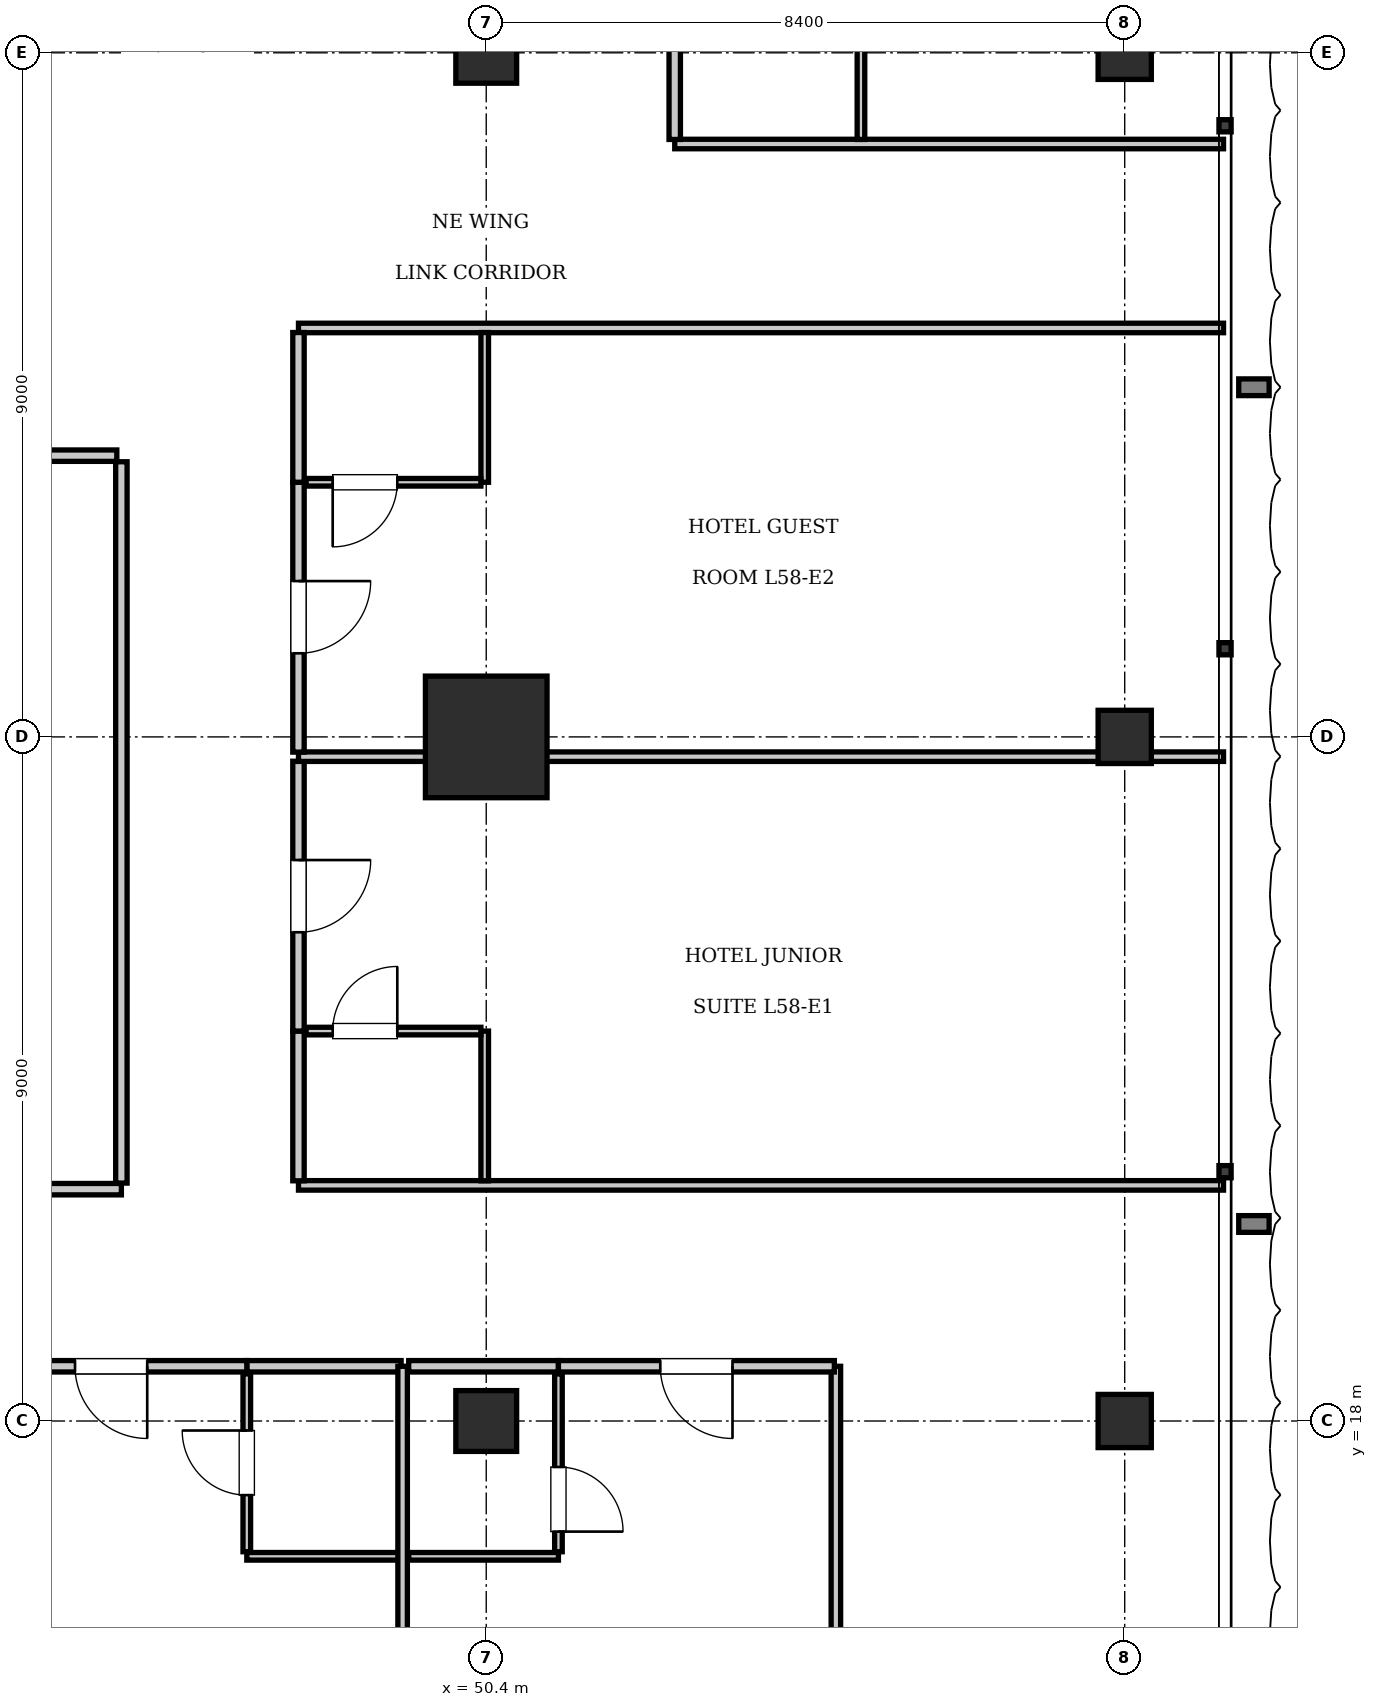
"""IFC4 building model, lengths in metres.
Left out: names, types, materials, properties, quantities, classifications, styles, units other than length and angle.
Written with IfcOpenShell. Run it as: python <this file> out.ifc"""

import sys

from ifc_helpers import new_model, si_unit, direction, frame, frame_2d, origin, origin_2d, place, context, subcontext, project, spatial, rectangle, extrude, element, fill, save


model = new_model("IFC4")
c1 = context("Model", 3, precision=1e-05, world=origin(), true_north=direction((0.0, 1.0)))
c2 = subcontext(c1, "Body", "Model", "MODEL_VIEW")
j1 = project(units=[si_unit("LENGTHUNIT", "METRE"), si_unit("PLANEANGLEUNIT", "RADIAN")], contexts=[c1])
p1 = place(None, origin())
s1 = spatial("IfcSite", under=j1, at=p1, CompositionType="ELEMENT")
p2 = place(p1, origin())
s2 = spatial("IfcBuilding", under=s1, at=p2, CompositionType="ELEMENT")
p3 = place(p2, frame((0.0, 0.0, 239.4)))
s3 = spatial("IfcBuildingStorey", under=s2, at=p3, CompositionType="ELEMENT", Elevation=239.4)
p4 = place(p3, frame((50.4, 27.0, 0.0), z_axis=(0.0, 0.0, 1.0), x_axis=(1.0, 0.0, 0.0)))
e1 = element("IfcColumn", 1, at=p4, inside=s3, PredefinedType="COLUMN", context=c2, shape_type="SweptSolid", body=[
    extrude(rectangle(XDim=1.6, YDim=1.6, at=origin_2d()), origin(), (0.0, 0.0, 1.0), 3.85),
])
for number, where, z_axis, x_axis in (
    (2, (50.4, 36.0, 0.0), (0.0, 0.0, 1.0), (1.0, 0.0, 0.0)),
    (3, (50.4, 18.0, 0.0), (0.0, 0.0, 1.0), (1.0, 0.0, 0.0)),
):
    element("IfcColumn", number, at=place(p3, frame(where, z_axis=z_axis, x_axis=x_axis)), inside=s3, PredefinedType="COLUMN", context=c2, shape_type="SweptSolid", body=[
        extrude(rectangle(XDim=0.8, YDim=0.8, at=origin_2d()), origin(), (0.0, 0.0, 1.0), 3.85),
    ])
for number, where, z_axis, x_axis in (
    (4, (58.8, 18.0, 0.0), (0.0, 0.0, 1.0), (1.0, 0.0, 0.0)),
    (5, (58.8, 27.0, 0.0), (0.0, 0.0, 1.0), (1.0, 0.0, 0.0)),
    (6, (58.8, 36.0, 0.0), (0.0, 0.0, 1.0), (1.0, 0.0, 0.0)),
):
    element("IfcColumn", number, at=place(p3, frame(where, z_axis=z_axis, x_axis=x_axis)), inside=s3, PredefinedType="COLUMN", context=c2, shape_type="SweptSolid", body=[
        extrude(rectangle(XDim=0.7, YDim=0.7, at=origin_2d()), origin(), (0.0, 0.0, 1.0), 3.85),
    ])
p5 = place(p3, frame((30.05, 21.05, 0.0), z_axis=(0.0, 0.0, 1.0), x_axis=(1.0, 0.0, 0.0)))
e7 = element("IfcWall", 7, at=p5, inside=s3, PredefinedType="PARTITIONING", context=c2, shape_type="SweptSolid", body=[
    extrude(rectangle(XDim=15.55, YDim=0.15, at=frame_2d((7.775, 0.0))), origin(), (0.0, 0.0, 1.0), 3.61),
])
p6 = place(p3, frame((45.6, 21.13, 0.0), z_axis=(0.0, 0.0, 1.0), x_axis=(0.0, 1.0, 0.0)))
e8 = element("IfcWall", 8, at=p6, inside=s3, PredefinedType="PARTITIONING", context=c2, shape_type="SweptSolid", body=[
    extrude(rectangle(XDim=9.49, YDim=0.15, at=frame_2d((4.745, 0.0))), origin(), (0.0, 0.0, 1.0), 3.61),
])
p7 = place(p3, frame((35.833, 30.7, 0.0), z_axis=(0.0, 0.0, 1.0), x_axis=(1.0, 0.0, 0.0)))
e9 = element("IfcWall", 9, at=p7, inside=s3, PredefinedType="PARTITIONING", context=c2, shape_type="SweptSolid", body=[
    extrude(rectangle(XDim=9.707, YDim=0.15, at=frame_2d((4.853, 0.0))), origin(), (0.0, 0.0, 1.0), 3.61),
])
p8 = place(p7, frame((4.403, 0.0, 0.0)))
e10 = element("IfcOpeningElement", 10, at=p8, cuts=e9, PredefinedType="OPENING", context=c2, shape_type="SweptSolid", body=[
    extrude(rectangle(XDim=0.9, YDim=2.1, at=frame_2d((0.45, 1.05))), frame((0.0, 0.085, 0.0), z_axis=(0.0, -1.0, 0.0), x_axis=(1.0, 0.0, 0.0)), (0.0, 0.0, 1.0), 0.17),
])
p9 = place(p3, frame((55.0, 14.4, 0.0), z_axis=(0.0, 0.0, 1.0), x_axis=(0.0, 1.0, 0.0)))
e11 = element("IfcWall", 11, at=p9, inside=s3, PredefinedType="PARTITIONING", context=c2, shape_type="SweptSolid", body=[
    extrude(rectangle(XDim=4.32, YDim=0.125, at=frame_2d((2.16, 0.0))), origin(), (0.0, 0.0, 1.0), 3.61),
])
p10 = place(p3, frame((47.25, 18.72, 0.0), z_axis=(0.0, 0.0, 1.0), x_axis=(1.0, 0.0, 0.0)))
e12 = element("IfcWall", 12, at=p10, inside=s3, PredefinedType="PARTITIONING", context=c2, shape_type="SweptSolid", body=[
    extrude(rectangle(XDim=2.03, YDim=0.15, at=frame_2d((1.015, 0.0))), origin(), (0.0, 0.0, 1.0), 3.61),
])
p11 = place(p3, frame((47.25, 16.22, 0.0), z_axis=(0.0, 0.0, 1.0), x_axis=(1.0, 0.0, 0.0)))
e13 = element("IfcWall", 13, at=p11, inside=s3, PredefinedType="PARTITIONING", context=c2, shape_type="SweptSolid", body=[
    extrude(rectangle(XDim=2.01, YDim=0.1, at=frame_2d((1.005, 0.0))), origin(), (0.0, 0.0, 1.0), 3.61),
])
p12 = place(p3, frame((47.25, 16.28, 0.0), z_axis=(0.0, 0.0, 1.0), x_axis=(0.0, 1.0, 0.0)))
e14 = element("IfcWall", 14, at=p12, inside=s3, PredefinedType="PARTITIONING", context=c2, shape_type="SweptSolid", body=[
    extrude(rectangle(XDim=2.34, YDim=0.1, at=frame_2d((1.17, 0.0))), origin(), (0.0, 0.0, 1.0), 3.61),
])
p13 = place(p12, frame((0.745, 0.0, 0.0)))
e15 = element("IfcOpeningElement", 15, at=p13, cuts=e14, PredefinedType="OPENING", context=c2, shape_type="SweptSolid", body=[
    extrude(rectangle(XDim=0.85, YDim=2.1, at=frame_2d((0.425, 1.05))), frame((0.0, 0.06, 0.0), z_axis=(0.0, -1.0, 0.0), x_axis=(1.0, 0.0, 0.0)), (0.0, 0.0, 1.0), 0.12),
])
p14 = place(p3, frame((43.68, 18.72, 0.0), z_axis=(0.0, 0.0, 1.0), x_axis=(1.0, 0.0, 0.0)))
e16 = element("IfcWall", 16, at=p14, inside=s3, PredefinedType="PARTITIONING", context=c2, shape_type="SweptSolid", body=[
    extrude(rectangle(XDim=3.57, YDim=0.15, at=frame_2d((1.785, 0.0))), origin(), (0.0, 0.0, 1.0), 3.61),
])
p15 = place(p14, frame((1.31, 0.0, 0.0)))
e17 = element("IfcOpeningElement", 17, at=p15, cuts=e16, PredefinedType="OPENING", context=c2, shape_type="SweptSolid", body=[
    extrude(rectangle(XDim=0.95, YDim=2.15, at=frame_2d((0.475, 1.075))), frame((0.0, 0.085, 0.0), z_axis=(0.0, -1.0, 0.0), x_axis=(1.0, 0.0, 0.0)), (0.0, 0.0, 1.0), 0.17),
])
p16 = place(p3, frame((49.3, 9.3, 0.0), z_axis=(0.0, 0.0, 1.0), x_axis=(0.0, 1.0, 0.0)))
e18 = element("IfcWall", 18, at=p16, inside=s3, PredefinedType="PARTITIONING", context=c2, shape_type="SweptSolid", body=[
    extrude(rectangle(XDim=9.42, YDim=0.125, at=frame_2d((4.71, 0.0))), origin(), (0.0, 0.0, 1.0), 3.61),
])
p17 = place(p3, frame((49.38, 18.72, 0.0), z_axis=(0.0, 0.0, 1.0), x_axis=(1.0, 0.0, 0.0)))
e19 = element("IfcWall", 19, at=p17, inside=s3, PredefinedType="PARTITIONING", context=c2, shape_type="SweptSolid", body=[
    extrude(rectangle(XDim=1.97, YDim=0.15, at=frame_2d((0.985, 0.0))), origin(), (0.0, 0.0, 1.0), 3.61),
])
p18 = place(p3, frame((49.38, 16.22, 0.0), z_axis=(0.0, 0.0, 1.0), x_axis=(1.0, 0.0, 0.0)))
e20 = element("IfcWall", 20, at=p18, inside=s3, PredefinedType="PARTITIONING", context=c2, shape_type="SweptSolid", body=[
    extrude(rectangle(XDim=1.97, YDim=0.1, at=frame_2d((0.985, 0.0))), origin(), (0.0, 0.0, 1.0), 3.61),
])
p19 = place(p3, frame((51.35, 16.28, 0.0), z_axis=(0.0, 0.0, 1.0), x_axis=(0.0, 1.0, 0.0)))
e21 = element("IfcWall", 21, at=p19, inside=s3, PredefinedType="PARTITIONING", context=c2, shape_type="SweptSolid", body=[
    extrude(rectangle(XDim=2.34, YDim=0.1, at=frame_2d((1.17, 0.0))), origin(), (0.0, 0.0, 1.0), 3.61),
])
p20 = place(p19, frame((0.265, 0.0, 0.0)))
e22 = element("IfcOpeningElement", 22, at=p20, cuts=e21, PredefinedType="OPENING", context=c2, shape_type="SweptSolid", body=[
    extrude(rectangle(XDim=0.85, YDim=2.1, at=frame_2d((0.425, 1.05))), frame((0.0, 0.06, 0.0), z_axis=(0.0, -1.0, 0.0), x_axis=(1.0, 0.0, 0.0)), (0.0, 0.0, 1.0), 0.12),
])
p21 = place(p3, frame((51.35, 18.72, 0.0), z_axis=(0.0, 0.0, 1.0), x_axis=(1.0, 0.0, 0.0)))
e23 = element("IfcWall", 23, at=p21, inside=s3, PredefinedType="PARTITIONING", context=c2, shape_type="SweptSolid", body=[
    extrude(rectangle(XDim=3.63, YDim=0.15, at=frame_2d((1.815, 0.0))), origin(), (0.0, 0.0, 1.0), 3.61),
])
p22 = place(p21, frame((1.34, 0.0, 0.0)))
e24 = element("IfcOpeningElement", 24, at=p22, cuts=e23, PredefinedType="OPENING", context=c2, shape_type="SweptSolid", body=[
    extrude(rectangle(XDim=0.95, YDim=2.15, at=frame_2d((0.475, 1.075))), frame((0.0, 0.085, 0.0), z_axis=(0.0, -1.0, 0.0), x_axis=(1.0, 0.0, 0.0)), (0.0, 0.0, 1.0), 0.17),
])
for number, where, z_axis, x_axis in (
    (25, (47.93, 21.1, 0.0), (0.0, 0.0, 1.0), (1.0, 0.0, 0.0)),
    (26, (47.93, 32.38, 0.0), (0.0, 0.0, 1.0), (1.0, 0.0, 0.0)),
):
    element("IfcWall", number, at=place(p3, frame(where, z_axis=z_axis, x_axis=x_axis)), inside=s3, PredefinedType="PARTITIONING", context=c2, shape_type="SweptSolid", body=[
        extrude(rectangle(XDim=12.17, YDim=0.125, at=frame_2d((6.085, 0.0))), origin(), (0.0, 0.0, 1.0), 3.61),
    ])
p23 = place(p3, frame((47.93, 21.16, 0.0), z_axis=(0.0, 0.0, 1.0), x_axis=(0.0, 1.0, 0.0)))
e27 = element("IfcWall", 27, at=p23, inside=s3, PredefinedType="PARTITIONING", context=c2, shape_type="SweptSolid", body=[
    extrude(rectangle(XDim=1.97, YDim=0.15, at=frame_2d((0.985, 0.0))), origin(), (0.0, 0.0, 1.0), 3.61),
])
p24 = place(p3, frame((47.93, 23.13, 0.0), z_axis=(0.0, 0.0, 1.0), x_axis=(0.0, 1.0, 0.0)))
e28 = element("IfcWall", 28, at=p24, inside=s3, PredefinedType="PARTITIONING", context=c2, shape_type="SweptSolid", body=[
    extrude(rectangle(XDim=3.55, YDim=0.15, at=frame_2d((1.775, 0.0))), origin(), (0.0, 0.0, 1.0), 3.61),
])
p25 = place(p24, frame((1.3, 0.0, 0.0)))
e29 = element("IfcOpeningElement", 29, at=p25, cuts=e28, PredefinedType="OPENING", context=c2, shape_type="SweptSolid", body=[
    extrude(rectangle(XDim=0.95, YDim=2.15, at=frame_2d((0.475, 1.075))), frame((0.0, 0.085, 0.0), z_axis=(0.0, -1.0, 0.0), x_axis=(1.0, 0.0, 0.0)), (0.0, 0.0, 1.0), 0.17),
])
p26 = place(p3, frame((50.38, 21.16, 0.0), z_axis=(0.0, 0.0, 1.0), x_axis=(0.0, 1.0, 0.0)))
e30 = element("IfcWall", 30, at=p26, inside=s3, PredefinedType="PARTITIONING", context=c2, shape_type="SweptSolid", body=[
    extrude(rectangle(XDim=1.97, YDim=0.1, at=frame_2d((0.985, 0.0))), origin(), (0.0, 0.0, 1.0), 3.077),
])
p27 = place(p3, frame((48.03, 23.13, 0.0), z_axis=(0.0, 0.0, 1.0), x_axis=(1.0, 0.0, 0.0)))
e31 = element("IfcWall", 31, at=p27, inside=s3, PredefinedType="PARTITIONING", context=c2, shape_type="SweptSolid", body=[
    extrude(rectangle(XDim=2.3, YDim=0.1, at=frame_2d((1.15, 0.0))), origin(), (0.0, 0.0, 1.0), 3.61),
])
p28 = place(p27, frame((0.35, 0.0, 0.0)))
e32 = element("IfcOpeningElement", 32, at=p28, cuts=e31, PredefinedType="OPENING", context=c2, shape_type="SweptSolid", body=[
    extrude(rectangle(XDim=0.85, YDim=2.1, at=frame_2d((0.425, 1.05))), frame((0.0, 0.06, 0.0), z_axis=(0.0, -1.0, 0.0), x_axis=(1.0, 0.0, 0.0)), (0.0, 0.0, 1.0), 0.12),
])
p29 = place(p3, frame((47.93, 26.74, 0.0), z_axis=(0.0, 0.0, 1.0), x_axis=(1.0, 0.0, 0.0)))
e33 = element("IfcWall", 33, at=p29, inside=s3, PredefinedType="PARTITIONING", context=c2, shape_type="SweptSolid", body=[
    extrude(rectangle(XDim=12.17, YDim=0.125, at=frame_2d((6.085, 0.0))), origin(), (0.0, 0.0, 1.0), 2.41),
])
p30 = place(p3, frame((47.93, 26.8, 0.0), z_axis=(0.0, 0.0, 1.0), x_axis=(0.0, 1.0, 0.0)))
e34 = element("IfcWall", 34, at=p30, inside=s3, PredefinedType="PARTITIONING", context=c2, shape_type="SweptSolid", body=[
    extrude(rectangle(XDim=3.55, YDim=0.15, at=frame_2d((1.775, 0.0))), origin(), (0.0, 0.0, 1.0), 3.61),
])
p31 = place(p30, frame((1.3, 0.0, 0.0)))
e35 = element("IfcOpeningElement", 35, at=p31, cuts=e34, PredefinedType="OPENING", context=c2, shape_type="SweptSolid", body=[
    extrude(rectangle(XDim=0.95, YDim=2.15, at=frame_2d((0.475, 1.075))), frame((0.0, 0.085, 0.0), z_axis=(0.0, -1.0, 0.0), x_axis=(1.0, 0.0, 0.0)), (0.0, 0.0, 1.0), 0.17),
])
p32 = place(p3, frame((47.93, 30.35, 0.0), z_axis=(0.0, 0.0, 1.0), x_axis=(0.0, 1.0, 0.0)))
e36 = element("IfcWall", 36, at=p32, inside=s3, PredefinedType="PARTITIONING", context=c2, shape_type="SweptSolid", body=[
    extrude(rectangle(XDim=1.97, YDim=0.15, at=frame_2d((0.985, 0.0))), origin(), (0.0, 0.0, 1.0), 3.61),
])
p33 = place(p3, frame((50.38, 30.35, 0.0), z_axis=(0.0, 0.0, 1.0), x_axis=(0.0, 1.0, 0.0)))
e37 = element("IfcWall", 37, at=p33, inside=s3, PredefinedType="PARTITIONING", context=c2, shape_type="SweptSolid", body=[
    extrude(rectangle(XDim=1.97, YDim=0.1, at=frame_2d((0.985, 0.0))), origin(), (0.0, 0.0, 1.0), 3.077),
])
p34 = place(p3, frame((48.03, 30.35, 0.0), z_axis=(0.0, 0.0, 1.0), x_axis=(1.0, 0.0, 0.0)))
e38 = element("IfcWall", 38, at=p34, inside=s3, PredefinedType="PARTITIONING", context=c2, shape_type="SweptSolid", body=[
    extrude(rectangle(XDim=2.3, YDim=0.1, at=frame_2d((1.15, 0.0))), origin(), (0.0, 0.0, 1.0), 3.61),
])
p35 = place(p34, frame((0.35, 0.0, 0.0)))
e39 = element("IfcOpeningElement", 39, at=p35, cuts=e38, PredefinedType="OPENING", context=c2, shape_type="SweptSolid", body=[
    extrude(rectangle(XDim=0.85, YDim=2.1, at=frame_2d((0.425, 1.05))), frame((0.0, 0.06, 0.0), z_axis=(0.0, -1.0, 0.0), x_axis=(1.0, 0.0, 0.0)), (0.0, 0.0, 1.0), 0.12),
])
p36 = place(p3, frame((52.88, 34.8, 0.0), z_axis=(0.0, 0.0, 1.0), x_axis=(1.0, 0.0, 0.0)))
e40 = element("IfcWall", 40, at=p36, inside=s3, PredefinedType="PARTITIONING", context=c2, shape_type="SweptSolid", body=[
    extrude(rectangle(XDim=7.22, YDim=0.125, at=frame_2d((3.61, 0.0))), origin(), (0.0, 0.0, 1.0), 3.61),
])
p37 = place(p3, frame((52.88, 34.86, 0.0), z_axis=(0.0, 0.0, 1.0), x_axis=(0.0, 1.0, 0.0)))
e41 = element("IfcWall", 41, at=p37, inside=s3, PredefinedType="PARTITIONING", context=c2, shape_type="SweptSolid", body=[
    extrude(rectangle(XDim=2.29, YDim=0.15, at=frame_2d((1.145, 0.0))), origin(), (0.0, 0.0, 1.0), 3.61),
])
p38 = place(p3, frame((55.33, 34.86, 0.0), z_axis=(0.0, 0.0, 1.0), x_axis=(0.0, 1.0, 0.0)))
e42 = element("IfcWall", 42, at=p38, inside=s3, PredefinedType="PARTITIONING", context=c2, shape_type="SweptSolid", body=[
    extrude(rectangle(XDim=2.29, YDim=0.1, at=frame_2d((1.145, 0.0))), origin(), (0.0, 0.0, 1.0), 3.61),
])
p39 = place(p13, origin())
e43 = element("IfcDoor", 43, at=p39, inside=s3, OperationType="SINGLE_SWING_RIGHT", PredefinedType="DOOR", context=c2, shape_type="SweptSolid", body=[
    extrude(rectangle(XDim=0.85, YDim=2.1, at=frame_2d((0.425, 1.05))), frame((0.0, 0.025, 0.0), z_axis=(0.0, -1.0, 0.0), x_axis=(1.0, 0.0, 0.0)), (0.0, 0.0, 1.0), 0.05),
])
fill(e15, e43)
p40 = place(p15, frame((0.95, 0.0, 0.0), z_axis=(0.0, 0.0, 1.0), x_axis=(-1.0, 0.0, 0.0)))
e44 = element("IfcDoor", 44, at=p40, inside=s3, OperationType="SINGLE_SWING_LEFT", PredefinedType="DOOR", context=c2, shape_type="SweptSolid", body=[
    extrude(rectangle(XDim=0.95, YDim=2.15, at=frame_2d((0.475, 1.075))), frame((0.0, 0.025, 0.0), z_axis=(0.0, -1.0, 0.0), x_axis=(1.0, 0.0, 0.0)), (0.0, 0.0, 1.0), 0.05),
])
fill(e17, e44)
p41 = place(p20, frame((0.85, 0.0, 0.0), z_axis=(0.0, 0.0, 1.0), x_axis=(-1.0, 0.0, 0.0)))
e45 = element("IfcDoor", 45, at=p41, inside=s3, OperationType="SINGLE_SWING_RIGHT", PredefinedType="DOOR", context=c2, shape_type="SweptSolid", body=[
    extrude(rectangle(XDim=0.85, YDim=2.1, at=frame_2d((0.425, 1.05))), frame((0.0, 0.025, 0.0), z_axis=(0.0, -1.0, 0.0), x_axis=(1.0, 0.0, 0.0)), (0.0, 0.0, 1.0), 0.05),
])
fill(e22, e45)
p42 = place(p22, frame((0.95, 0.0, 0.0), z_axis=(0.0, 0.0, 1.0), x_axis=(-1.0, 0.0, 0.0)))
e46 = element("IfcDoor", 46, at=p42, inside=s3, OperationType="SINGLE_SWING_LEFT", PredefinedType="DOOR", context=c2, shape_type="SweptSolid", body=[
    extrude(rectangle(XDim=0.95, YDim=2.15, at=frame_2d((0.475, 1.075))), frame((0.0, 0.025, 0.0), z_axis=(0.0, -1.0, 0.0), x_axis=(1.0, 0.0, 0.0)), (0.0, 0.0, 1.0), 0.05),
])
fill(e24, e46)
p43 = place(p28, origin())
e47 = element("IfcDoor", 47, at=p43, inside=s3, OperationType="SINGLE_SWING_RIGHT", PredefinedType="DOOR", context=c2, shape_type="SweptSolid", body=[
    extrude(rectangle(XDim=0.85, YDim=2.1, at=frame_2d((0.425, 1.05))), frame((0.0, 0.025, 0.0), z_axis=(0.0, -1.0, 0.0), x_axis=(1.0, 0.0, 0.0)), (0.0, 0.0, 1.0), 0.05),
])
fill(e32, e47)
p44 = place(p25, frame((0.95, 0.0, 0.0), z_axis=(0.0, 0.0, 1.0), x_axis=(-1.0, 0.0, 0.0)))
e48 = element("IfcDoor", 48, at=p44, inside=s3, OperationType="SINGLE_SWING_LEFT", PredefinedType="DOOR", context=c2, shape_type="SweptSolid", body=[
    extrude(rectangle(XDim=0.95, YDim=2.15, at=frame_2d((0.475, 1.075))), frame((0.0, 0.025, 0.0), z_axis=(0.0, -1.0, 0.0), x_axis=(1.0, 0.0, 0.0)), (0.0, 0.0, 1.0), 0.05),
])
fill(e29, e48)
p45 = place(p35, frame((0.85, 0.0, 0.0), z_axis=(0.0, 0.0, 1.0), x_axis=(-1.0, 0.0, 0.0)))
e49 = element("IfcDoor", 49, at=p45, inside=s3, OperationType="SINGLE_SWING_RIGHT", PredefinedType="DOOR", context=c2, shape_type="SweptSolid", body=[
    extrude(rectangle(XDim=0.85, YDim=2.1, at=frame_2d((0.425, 1.05))), frame((0.0, 0.025, 0.0), z_axis=(0.0, -1.0, 0.0), x_axis=(1.0, 0.0, 0.0)), (0.0, 0.0, 1.0), 0.05),
])
fill(e39, e49)
p46 = place(p31, frame((0.95, 0.0, 0.0), z_axis=(0.0, 0.0, 1.0), x_axis=(-1.0, 0.0, 0.0)))
e50 = element("IfcDoor", 50, at=p46, inside=s3, OperationType="SINGLE_SWING_LEFT", PredefinedType="DOOR", context=c2, shape_type="SweptSolid", body=[
    extrude(rectangle(XDim=0.95, YDim=2.15, at=frame_2d((0.475, 1.075))), frame((0.0, 0.025, 0.0), z_axis=(0.0, -1.0, 0.0), x_axis=(1.0, 0.0, 0.0)), (0.0, 0.0, 1.0), 0.05),
])
fill(e35, e50)
save(model, sys.argv[1])
